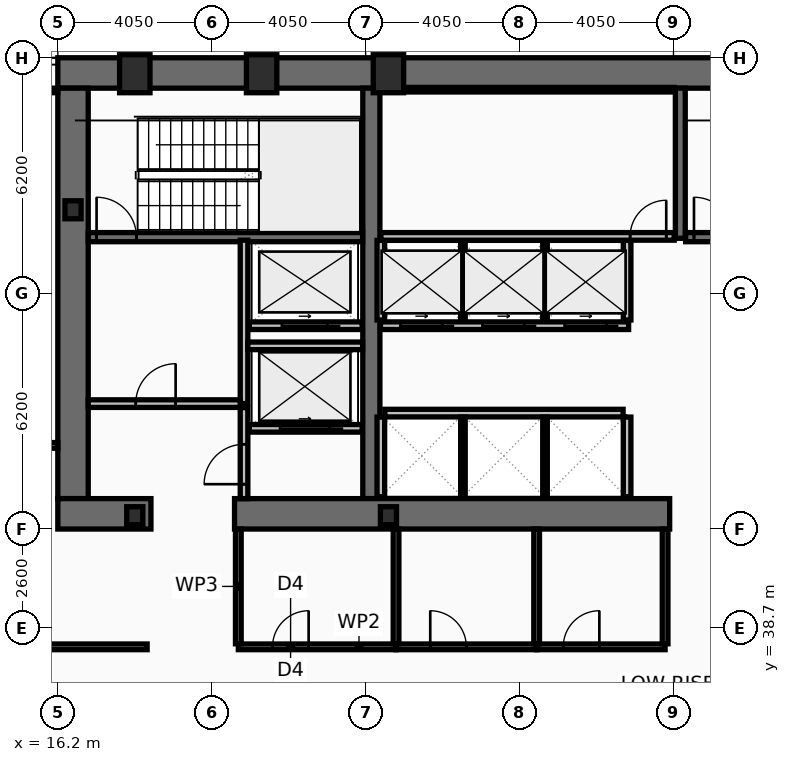
"""IFC4 building model, lengths in metres.
Left out: names, types, materials, properties, quantities, classifications, styles, units other than length and angle.
Written with IfcOpenShell. Run it as: python <this file> out.ifc"""

import sys

from ifc_helpers import new_model, si_unit, direction, frame, frame_2d, origin, origin_2d, place, context, subcontext, project, spatial, rectangle, hollow_rectangle, i_section, extrude, element, fill, save


model = new_model("IFC4")
c1 = context("Model", 3, precision=1e-05, world=origin(), true_north=direction((0.0, 1.0)))
c2 = subcontext(c1, "Body", "Model", "MODEL_VIEW")
j1 = project(units=[si_unit("LENGTHUNIT", "METRE"), si_unit("PLANEANGLEUNIT", "RADIAN")], contexts=[c1])
p1 = place(None, origin())
s1 = spatial("IfcSite", under=j1, at=p1, CompositionType="ELEMENT")
p2 = place(p1, origin())
s2 = spatial("IfcBuilding", under=s1, at=p2, CompositionType="ELEMENT")
p3 = place(p2, frame((0.0, 0.0, 45.8)))
s3 = spatial("IfcBuildingStorey", under=s2, at=p3, CompositionType="ELEMENT", Elevation=45.8)
p4 = place(p3, frame((16.2, 53.3, 0.0), z_axis=(0.0, 0.0, 1.0), x_axis=(1.0, 0.0, 0.0)))
e1 = element("IfcWall", 1, at=p4, inside=s3, PredefinedType="SHEAR", context=c2, shape_type="SweptSolid", body=[
    extrude(rectangle(XDim=40.5, YDim=0.8, at=frame_2d((20.25, 0.0))), origin(), (0.0, 0.0, 1.0), 3.82),
])
p5 = place(p3, frame((16.6, 42.1, 0.0), z_axis=(0.0, 0.0, 1.0), x_axis=(0.0, 1.0, 0.0)))
e2 = element("IfcWall", 2, at=p5, inside=s3, PredefinedType="SHEAR", context=c2, shape_type="SweptSolid", body=[
    extrude(rectangle(XDim=10.8, YDim=0.8, at=frame_2d((5.4, 0.0))), origin(), (0.0, 0.0, 1.0), 3.82),
])
p6 = place(p3, frame((24.45, 42.1, 0.0), z_axis=(0.0, 0.0, 1.0), x_axis=(0.0, 1.0, 0.0)))
e3 = element("IfcWall", 3, at=p6, inside=s3, PredefinedType="SHEAR", context=c2, shape_type="SweptSolid", body=[
    extrude(rectangle(XDim=10.8, YDim=0.45, at=frame_2d((5.4, 0.0))), origin(), (0.0, 0.0, 1.0), 3.82),
])
p7 = place(p3, frame((18.65, 41.7, 0.0), z_axis=(0.0, 0.0, 1.0), x_axis=(-1.0, 0.0, 0.0)))
e4 = element("IfcWall", 4, at=p7, inside=s3, PredefinedType="SHEAR", context=c2, shape_type="SweptSolid", body=[
    extrude(rectangle(XDim=2.45, YDim=0.8, at=frame_2d((1.225, 0.0))), origin(), (0.0, 0.0, 1.0), 3.82),
])
p8 = place(p3, frame((32.3, 41.7, 0.0), z_axis=(0.0, 0.0, 1.0), x_axis=(-1.0, 0.0, 0.0)))
e5 = element("IfcWall", 5, at=p8, inside=s3, PredefinedType="SHEAR", context=c2, shape_type="SweptSolid", body=[
    extrude(rectangle(XDim=11.45, YDim=0.8, at=frame_2d((5.725, 0.0))), origin(), (0.0, 0.0, 1.0), 3.82),
])
p9 = place(p3, frame((32.58, 48.95, 0.0), z_axis=(0.0, 0.0, 1.0), x_axis=(0.0, 1.0, 0.0)))
e6 = element("IfcWall", 6, at=p9, inside=s3, PredefinedType="SHEAR", context=c2, shape_type="SweptSolid", body=[
    extrude(rectangle(XDim=3.95, YDim=0.26, at=frame_2d((1.975, 0.0))), origin(), (0.0, 0.0, 1.0), 3.82),
])
p10 = place(p3, frame((17.0, 48.98, 0.0), z_axis=(0.0, 0.0, 1.0), x_axis=(1.0, 0.0, 0.0)))
e7 = element("IfcWall", 7, at=p10, inside=s3, PredefinedType="SHEAR", context=c2, shape_type="SweptSolid", body=[
    extrude(rectangle(XDim=7.22, YDim=0.24, at=frame_2d((3.61, 0.0))), origin(), (0.0, 0.0, 1.0), 3.82),
])
p11 = place(p10, frame((0.22, 0.0, 0.0)))
e8 = element("IfcOpeningElement", 8, at=p11, cuts=e7, PredefinedType="OPENING", context=c2, shape_type="SweptSolid", body=[
    extrude(rectangle(XDim=1.05, YDim=2.15, at=frame_2d((0.525, 1.075))), frame((0.0, 0.13, 0.0), z_axis=(0.0, -1.0, 0.0), x_axis=(1.0, 0.0, 0.0)), (0.0, 0.0, 1.0), 0.26),
])
p12 = place(p3, frame((32.72, 48.98, 0.0), z_axis=(0.0, 0.0, 1.0), x_axis=(1.0, 0.0, 0.0)))
e9 = element("IfcWall", 9, at=p12, inside=s3, PredefinedType="SHEAR", context=c2, shape_type="SweptSolid", body=[
    extrude(rectangle(XDim=7.56, YDim=0.24, at=frame_2d((3.78, 0.0))), origin(), (0.0, 0.0, 1.0), 3.82),
])
p13 = place(p12, frame((0.22, 0.0, 0.0)))
e10 = element("IfcOpeningElement", 10, at=p13, cuts=e9, PredefinedType="OPENING", context=c2, shape_type="SweptSolid", body=[
    extrude(rectangle(XDim=1.05, YDim=2.15, at=frame_2d((0.525, 1.075))), frame((0.0, 0.13, 0.0), z_axis=(0.0, -1.0, 0.0), x_axis=(1.0, 0.0, 0.0)), (0.0, 0.0, 1.0), 0.26),
])
for number, where, z_axis, x_axis in (
    (11, (18.225, 53.28, 0.0), (0.0, 0.0, 1.0), (1.0, 0.0, 0.0)),
    (12, (21.562, 53.28, 0.0), (0.0, 0.0, 1.0), (1.0, 0.0, 0.0)),
    (13, (24.9, 53.28, 0.0), (0.0, 0.0, 1.0), (1.0, 0.0, 0.0)),
):
    element("IfcColumn", number, at=place(p3, frame(where, z_axis=z_axis, x_axis=x_axis)), inside=s3, PredefinedType="COLUMN", context=c2, shape_type="SweptSolid", body=[
        extrude(hollow_rectangle(XDim=0.8, YDim=1.0, WallThickness=0.055, at=origin_2d()), origin(), (0.0, 0.0, 1.0), 4.0),
    ])
for number, where, z_axis, x_axis in (
    (14, (16.6, 49.7, 0.0), (0.0, 0.0, 1.0), (1.0, 0.0, 0.0)),
    (15, (18.225, 41.65, 0.0), (0.0, 0.0, 1.0), (1.0, 0.0, 0.0)),
    (16, (24.9, 41.65, 0.0), (0.0, 0.0, 1.0), (1.0, 0.0, 0.0)),
):
    element("IfcColumn", number, at=place(p3, frame(where, z_axis=z_axis, x_axis=x_axis)), inside=s3, PredefinedType="COLUMN", context=c2, shape_type="SweptSolid", body=[
        extrude(i_section(OverallWidth=0.424, OverallDepth=0.474, WebThickness=0.048, FlangeThickness=0.077, at=origin_2d()), origin(), (0.0, 0.0, 1.0), 4.0),
    ])
p14 = place(p3, frame((24.21, 43.95, 0.0), z_axis=(0.0, 0.0, 1.0), x_axis=(-1.0, 0.0, 0.0)))
e17 = element("IfcWall", 17, at=p14, inside=s3, PredefinedType="PARTITIONING", context=c2, shape_type="SweptSolid", body=[
    extrude(rectangle(XDim=2.97, YDim=0.2, at=frame_2d((1.485, 0.0))), origin(), (0.0, 0.0, 1.0), 3.82),
])
p15 = place(p14, frame((0.86, 0.0, 0.0)))
e18 = element("IfcOpeningElement", 18, at=p15, cuts=e17, PredefinedType="OPENING", context=c2, shape_type="SweptSolid", body=[
    extrude(rectangle(XDim=1.3, YDim=2.18, at=frame_2d((0.65, 1.09))), frame((0.0, 0.11, 0.0), z_axis=(0.0, -1.0, 0.0), x_axis=(1.0, 0.0, 0.0)), (0.0, 0.0, 1.0), 0.22),
])
p16 = place(p3, frame((24.21, 46.65, 0.0), z_axis=(0.0, 0.0, 1.0), x_axis=(-1.0, 0.0, 0.0)))
e19 = element("IfcWall", 19, at=p16, inside=s3, PredefinedType="PARTITIONING", context=c2, shape_type="SweptSolid", body=[
    extrude(rectangle(XDim=2.97, YDim=0.2, at=frame_2d((1.485, 0.0))), origin(), (0.0, 0.0, 1.0), 3.82),
])
p17 = place(p16, frame((0.91, 0.0, 0.0)))
e20 = element("IfcOpeningElement", 20, at=p17, cuts=e19, PredefinedType="OPENING", context=c2, shape_type="SweptSolid", body=[
    extrude(rectangle(XDim=1.2, YDim=2.18, at=frame_2d((0.6, 1.09))), frame((0.0, 0.11, 0.0), z_axis=(0.0, -1.0, 0.0), x_axis=(1.0, 0.0, 0.0)), (0.0, 0.0, 1.0), 0.22),
])
p18 = place(p3, frame((31.22, 46.65, 0.0), z_axis=(0.0, 0.0, 1.0), x_axis=(-1.0, 0.0, 0.0)))
e21 = element("IfcWall", 21, at=p18, inside=s3, PredefinedType="PARTITIONING", context=c2, shape_type="SweptSolid", body=[
    extrude(rectangle(XDim=6.53, YDim=0.2, at=frame_2d((3.265, 0.0))), origin(), (0.0, 0.0, 1.0), 3.82),
])
p19 = place(p18, frame((4.9, 0.0, 0.0)))
e22 = element("IfcOpeningElement", 22, at=p19, cuts=e21, PredefinedType="OPENING", context=c2, shape_type="SweptSolid", body=[
    extrude(rectangle(XDim=1.1, YDim=2.18, at=frame_2d((0.55, 1.09))), frame((0.0, 0.11, 0.0), z_axis=(0.0, -1.0, 0.0), x_axis=(1.0, 0.0, 0.0)), (0.0, 0.0, 1.0), 0.22),
])
p20 = place(p18, frame((2.74, 0.0, 0.0)))
e23 = element("IfcOpeningElement", 23, at=p20, cuts=e21, PredefinedType="OPENING", context=c2, shape_type="SweptSolid", body=[
    extrude(rectangle(XDim=1.1, YDim=2.18, at=frame_2d((0.55, 1.09))), frame((0.0, 0.11, 0.0), z_axis=(0.0, -1.0, 0.0), x_axis=(1.0, 0.0, 0.0)), (0.0, 0.0, 1.0), 0.22),
])
p21 = place(p18, frame((0.58, 0.0, 0.0)))
e24 = element("IfcOpeningElement", 24, at=p21, cuts=e21, PredefinedType="OPENING", context=c2, shape_type="SweptSolid", body=[
    extrude(rectangle(XDim=1.1, YDim=2.18, at=frame_2d((0.55, 1.09))), frame((0.0, 0.11, 0.0), z_axis=(0.0, -1.0, 0.0), x_axis=(1.0, 0.0, 0.0)), (0.0, 0.0, 1.0), 0.22),
])
p22 = place(p3, frame((21.1, 44.6, 0.0), z_axis=(0.0, 0.0, 1.0), x_axis=(0.0, 1.0, 0.0)))
e25 = element("IfcWall", 25, at=p22, inside=s3, PredefinedType="PARTITIONING", context=c2, shape_type="SweptSolid", body=[
    extrude(rectangle(XDim=4.3, YDim=0.2, at=frame_2d((2.15, 0.0))), origin(), (0.0, 0.0, 1.0), 3.82),
])
p23 = place(p3, frame((17.0, 44.6, 0.0), z_axis=(0.0, 0.0, 1.0), x_axis=(1.0, 0.0, 0.0)))
e26 = element("IfcWall", 26, at=p23, inside=s3, PredefinedType="PARTITIONING", context=c2, shape_type="SweptSolid", body=[
    extrude(rectangle(XDim=4.0, YDim=0.2, at=frame_2d((2.0, 0.0))), origin(), (0.0, 0.0, 1.0), 3.82),
])
p24 = place(p23, frame((1.25, 0.0, 0.0)))
e27 = element("IfcOpeningElement", 27, at=p24, cuts=e26, PredefinedType="OPENING", context=c2, shape_type="SweptSolid", body=[
    extrude(rectangle(XDim=1.05, YDim=2.15, at=frame_2d((0.525, 1.075))), frame((0.0, 0.11, 0.0), z_axis=(0.0, -1.0, 0.0), x_axis=(1.0, 0.0, 0.0)), (0.0, 0.0, 1.0), 0.22),
])
p25 = place(p3, frame((21.2, 46.12, 0.0), z_axis=(0.0, 0.0, 1.0), x_axis=(1.0, 0.0, 0.0)))
e28 = element("IfcWall", 28, at=p25, inside=s3, PredefinedType="PARTITIONING", context=c2, shape_type="SweptSolid", body=[
    extrude(rectangle(XDim=3.02, YDim=0.2, at=frame_2d((1.51, 0.0))), origin(), (0.0, 0.0, 1.0), 3.82),
])
p26 = place(p3, frame((21.1, 42.1, 0.0), z_axis=(0.0, 0.0, 1.0), x_axis=(0.0, 1.0, 0.0)))
e29 = element("IfcWall", 29, at=p26, inside=s3, PredefinedType="PARTITIONING", context=c2, shape_type="SweptSolid", body=[
    extrude(rectangle(XDim=2.395, YDim=0.2, at=frame_2d((1.198, 0.0))), origin(), (0.0, 0.0, 1.0), 3.82),
])
p27 = place(p26, frame((0.38, 0.0, 0.0)))
e30 = element("IfcOpeningElement", 30, at=p27, cuts=e29, PredefinedType="OPENING", context=c2, shape_type="SweptSolid", body=[
    extrude(rectangle(XDim=1.05, YDim=2.15, at=frame_2d((0.525, 1.075))), frame((0.0, 0.11, 0.0), z_axis=(0.0, -1.0, 0.0), x_axis=(1.0, 0.0, 0.0)), (0.0, 0.0, 1.0), 0.22),
])
for number, where, z_axis, x_axis in (
    (31, (24.7, 46.8, 0.0), (0.0, 0.0, 1.0), (0.0, 1.0, 0.0)),
    (32, (31.18, 46.8, 0.0), (0.0, 0.0, 1.0), (0.0, 1.0, 0.0)),
):
    element("IfcWall", number, at=place(p3, frame(where, z_axis=z_axis, x_axis=x_axis)), inside=s3, PredefinedType="PARTITIONING", context=c2, shape_type="SweptSolid", body=[
        extrude(rectangle(XDim=2.095, YDim=0.2, at=frame_2d((1.047, 0.0))), origin(), (0.0, 0.0, 1.0), 3.82),
    ])
for number, where, z_axis, x_axis in (
    (33, (26.86, 46.8, 0.0), (0.0, 0.0, 1.0), (0.0, 1.0, 0.0)),
    (34, (29.02, 46.8, 0.0), (0.0, 0.0, 1.0), (0.0, 1.0, 0.0)),
):
    element("IfcWall", number, at=place(p3, frame(where, z_axis=z_axis, x_axis=x_axis)), inside=s3, PredefinedType="PARTITIONING", context=c2, shape_type="SweptSolid", body=[
        extrude(rectangle(XDim=2.095, YDim=0.12, at=frame_2d((1.047, 0.0))), origin(), (0.0, 0.0, 1.0), 3.82),
    ])
p28 = place(p3, frame((24.805, 44.35, 0.0), z_axis=(0.0, 0.0, 1.0), x_axis=(1.0, 0.0, 0.0)))
e35 = element("IfcWall", 35, at=p28, inside=s3, PredefinedType="PARTITIONING", context=c2, shape_type="SweptSolid", body=[
    extrude(rectangle(XDim=6.27, YDim=0.2, at=frame_2d((3.135, 0.0))), origin(), (0.0, 0.0, 1.0), 3.82),
])
for number, where, z_axis, x_axis in (
    (36, (24.7, 42.15, 0.0), (0.0, 0.0, 1.0), (0.0, 1.0, 0.0)),
    (37, (31.18, 42.15, 0.0), (0.0, 0.0, 1.0), (0.0, 1.0, 0.0)),
):
    element("IfcWall", number, at=place(p3, frame(where, z_axis=z_axis, x_axis=x_axis)), inside=s3, PredefinedType="PARTITIONING", context=c2, shape_type="SweptSolid", body=[
        extrude(rectangle(XDim=2.095, YDim=0.2, at=frame_2d((1.048, 0.0))), origin(), (0.0, 0.0, 1.0), 3.82),
    ])
for number, where, z_axis, x_axis in (
    (38, (26.86, 42.15, 0.0), (0.0, 0.0, 1.0), (0.0, 1.0, 0.0)),
    (39, (29.02, 42.15, 0.0), (0.0, 0.0, 1.0), (0.0, 1.0, 0.0)),
):
    element("IfcWall", number, at=place(p3, frame(where, z_axis=z_axis, x_axis=x_axis)), inside=s3, PredefinedType="PARTITIONING", context=c2, shape_type="SweptSolid", body=[
        extrude(rectangle(XDim=2.095, YDim=0.12, at=frame_2d((1.048, 0.0))), origin(), (0.0, 0.0, 1.0), 3.82),
    ])
p29 = place(p3, frame((24.7, 52.86, 0.0), z_axis=(0.0, 0.0, 1.0), x_axis=(1.0, 0.0, 0.0)))
e40 = element("IfcWall", 40, at=p29, inside=s3, PredefinedType="PARTITIONING", context=c2, shape_type="SweptSolid", body=[
    extrude(rectangle(XDim=7.72, YDim=0.12, at=frame_2d((3.86, 0.0))), origin(), (0.0, 0.0, 1.0), 3.82),
])
p30 = place(p3, frame((24.7, 49.0, 0.0), z_axis=(0.0, 0.0, 1.0), x_axis=(1.0, 0.0, 0.0)))
e41 = element("IfcWall", 41, at=p30, inside=s3, PredefinedType="PARTITIONING", context=c2, shape_type="SweptSolid", body=[
    extrude(rectangle(XDim=7.72, YDim=0.2, at=frame_2d((3.86, 0.0))), origin(), (0.0, 0.0, 1.0), 3.82),
])
p31 = place(p30, frame((6.56, 0.0, 0.0)))
e42 = element("IfcOpeningElement", 42, at=p31, cuts=e41, PredefinedType="OPENING", context=c2, shape_type="SweptSolid", body=[
    extrude(rectangle(XDim=0.95, YDim=2.1, at=frame_2d((0.475, 1.05))), frame((0.0, 0.11, 0.0), z_axis=(0.0, -1.0, 0.0), x_axis=(1.0, 0.0, 0.0)), (0.0, 0.0, 1.0), 0.22),
])
p32 = place(p3, frame((20.95, 38.2, 0.0), z_axis=(0.0, 0.0, 1.0), x_axis=(1.0, 0.0, 0.0)))
e43 = element("IfcWall", 43, at=p32, inside=s3, PredefinedType="PARTITIONING", context=c2, shape_type="SweptSolid", body=[
    extrude(rectangle(XDim=4.15, YDim=0.15, at=frame_2d((2.075, 0.0))), origin(), (0.0, 0.0, 1.0), 3.01),
])
p33 = place(p32, frame((0.9, 0.0, 0.0)))
e44 = element("IfcOpeningElement", 44, at=p33, cuts=e43, PredefinedType="OPENING", context=c2, shape_type="SweptSolid", body=[
    extrude(rectangle(XDim=0.95, YDim=2.05, at=frame_2d((0.475, 1.025))), frame((0.0, 0.085, 0.0), z_axis=(0.0, -1.0, 0.0), x_axis=(1.0, 0.0, 0.0)), (0.0, 0.0, 1.0), 0.17),
])
p34 = place(p3, frame((25.1, 38.2, 0.0), z_axis=(0.0, 0.0, 1.0), x_axis=(1.0, 0.0, 0.0)))
e45 = element("IfcWall", 45, at=p34, inside=s3, PredefinedType="PARTITIONING", context=c2, shape_type="SweptSolid", body=[
    extrude(rectangle(XDim=3.7, YDim=0.15, at=frame_2d((1.85, 0.0))), origin(), (0.0, 0.0, 1.0), 3.01),
])
p35 = place(p34, frame((0.9, 0.0, 0.0)))
e46 = element("IfcOpeningElement", 46, at=p35, cuts=e45, PredefinedType="OPENING", context=c2, shape_type="SweptSolid", body=[
    extrude(rectangle(XDim=0.95, YDim=2.05, at=frame_2d((0.475, 1.025))), frame((0.0, 0.085, 0.0), z_axis=(0.0, -1.0, 0.0), x_axis=(1.0, 0.0, 0.0)), (0.0, 0.0, 1.0), 0.17),
])
p36 = place(p3, frame((28.8, 38.2, 0.0), z_axis=(0.0, 0.0, 1.0), x_axis=(1.0, 0.0, 0.0)))
e47 = element("IfcWall", 47, at=p36, inside=s3, PredefinedType="PARTITIONING", context=c2, shape_type="SweptSolid", body=[
    extrude(rectangle(XDim=3.38, YDim=0.15, at=frame_2d((1.69, 0.0))), origin(), (0.0, 0.0, 1.0), 3.01),
])
p37 = place(p36, frame((0.7, 0.0, 0.0)))
e48 = element("IfcOpeningElement", 48, at=p37, cuts=e47, PredefinedType="OPENING", context=c2, shape_type="SweptSolid", body=[
    extrude(rectangle(XDim=0.95, YDim=2.05, at=frame_2d((0.475, 1.025))), frame((0.0, 0.085, 0.0), z_axis=(0.0, -1.0, 0.0), x_axis=(1.0, 0.0, 0.0)), (0.0, 0.0, 1.0), 0.17),
])
p38 = place(p3, frame((20.95, 38.28, 0.0), z_axis=(0.0, 0.0, 1.0), x_axis=(0.0, 1.0, 0.0)))
e49 = element("IfcWall", 49, at=p38, inside=s3, PredefinedType="PARTITIONING", context=c2, shape_type="SweptSolid", body=[
    extrude(rectangle(XDim=3.02, YDim=0.15, at=frame_2d((1.51, 0.0))), origin(), (0.0, 0.0, 1.0), 3.82),
])
p39 = place(p3, frame((25.1, 38.28, 0.0), z_axis=(0.0, 0.0, 1.0), x_axis=(0.0, 1.0, 0.0)))
e50 = element("IfcWall", 50, at=p39, inside=s3, PredefinedType="PARTITIONING", context=c2, shape_type="SweptSolid", body=[
    extrude(rectangle(XDim=3.02, YDim=0.15, at=frame_2d((1.51, 0.0))), origin(), (0.0, 0.0, 1.0), 3.01),
])
for number, where, z_axis, x_axis in (
    (51, (28.8, 38.28, 0.0), (0.0, 0.0, 1.0), (0.0, 1.0, 0.0)),
    (52, (32.18, 38.28, 0.0), (0.0, 0.0, 1.0), (0.0, 1.0, 0.0)),
):
    element("IfcWall", number, at=place(p3, frame(where, z_axis=z_axis, x_axis=x_axis)), inside=s3, PredefinedType="PARTITIONING", context=c2, shape_type="SweptSolid", body=[
        extrude(rectangle(XDim=3.02, YDim=0.15, at=frame_2d((1.51, 0.0))), origin(), (0.0, 0.0, 1.0), 3.82),
    ])
p40 = place(p3, frame((2.03, 38.2, 0.0), z_axis=(0.0, 0.0, 1.0), x_axis=(1.0, 0.0, 0.0)))
e53 = element("IfcWall", 53, at=p40, inside=s3, PredefinedType="PARTITIONING", context=c2, shape_type="SweptSolid", body=[
    extrude(rectangle(XDim=16.52, YDim=0.15, at=frame_2d((8.26, 0.0))), origin(), (0.0, 0.0, 1.0), 3.01),
])
p41 = place(p40, frame((12.32, 0.0, 0.0)))
e54 = element("IfcOpeningElement", 54, at=p41, cuts=e53, PredefinedType="OPENING", context=c2, shape_type="SweptSolid", body=[
    extrude(rectangle(XDim=0.95, YDim=2.05, at=frame_2d((0.475, 1.025))), frame((0.0, 0.085, 0.0), z_axis=(0.0, -1.0, 0.0), x_axis=(1.0, 0.0, 0.0)), (0.0, 0.0, 1.0), 0.17),
])
p42 = place(p3, frame((2.095, 43.5, 0.0), z_axis=(0.0, 0.0, 1.0), x_axis=(1.0, 0.0, 0.0)))
e55 = element("IfcWall", 55, at=p42, inside=s3, PredefinedType="PARTITIONING", context=c2, shape_type="SweptSolid", body=[
    extrude(rectangle(XDim=14.105, YDim=0.15, at=frame_2d((7.052, 0.0))), origin(), (0.0, 0.0, 1.0), 3.01),
])
p43 = place(p42, frame((12.32, 0.0, 0.0)))
e56 = element("IfcOpeningElement", 56, at=p43, cuts=e55, PredefinedType="OPENING", context=c2, shape_type="SweptSolid", body=[
    extrude(rectangle(XDim=0.9, YDim=2.05, at=frame_2d((0.45, 1.025))), frame((0.0, 0.085, 0.0), z_axis=(0.0, -1.0, 0.0), x_axis=(1.0, 0.0, 0.0)), (0.0, 0.0, 1.0), 0.17),
])
p44 = place(p3, frame((2.095, 52.84, 0.0), z_axis=(0.0, 0.0, 1.0), x_axis=(1.0, 0.0, 0.0)))
e57 = element("IfcWall", 57, at=p44, inside=s3, PredefinedType="PARTITIONING", context=c2, shape_type="SweptSolid", body=[
    extrude(rectangle(XDim=14.105, YDim=0.12, at=frame_2d((7.052, 0.0))), origin(), (0.0, 0.0, 1.0), 3.82),
])
p45 = place(p11, origin())
e58 = element("IfcDoor", 58, at=p45, inside=s3, OperationType="SINGLE_SWING_LEFT", PredefinedType="DOOR", context=c2, shape_type="SweptSolid", body=[
    extrude(rectangle(XDim=1.05, YDim=2.15, at=frame_2d((0.525, 1.075))), frame((0.0, 0.025, 0.0), z_axis=(0.0, -1.0, 0.0), x_axis=(1.0, 0.0, 0.0)), (0.0, 0.0, 1.0), 0.05),
])
fill(e8, e58)
p46 = place(p13, origin())
e59 = element("IfcDoor", 59, at=p46, inside=s3, OperationType="SINGLE_SWING_LEFT", PredefinedType="DOOR", context=c2, shape_type="SweptSolid", body=[
    extrude(rectangle(XDim=1.05, YDim=2.15, at=frame_2d((0.525, 1.075))), frame((0.0, 0.025, 0.0), z_axis=(0.0, -1.0, 0.0), x_axis=(1.0, 0.0, 0.0)), (0.0, 0.0, 1.0), 0.05),
])
fill(e10, e59)
p47 = place(p15, origin())
e60 = element("IfcDoor", 60, at=p47, inside=s3, OperationType="SLIDING_TO_LEFT", PredefinedType="DOOR", context=c2, shape_type="SweptSolid", body=[
    extrude(rectangle(XDim=1.3, YDim=2.18, at=frame_2d((0.65, 1.09))), frame((0.0, 0.025, 0.0), z_axis=(0.0, -1.0, 0.0), x_axis=(1.0, 0.0, 0.0)), (0.0, 0.0, 1.0), 0.05),
])
fill(e18, e60)
p48 = place(p17, origin())
e61 = element("IfcDoor", 61, at=p48, inside=s3, OperationType="SLIDING_TO_LEFT", PredefinedType="DOOR", context=c2, shape_type="SweptSolid", body=[
    extrude(rectangle(XDim=1.2, YDim=2.18, at=frame_2d((0.6, 1.09))), frame((0.0, 0.025, 0.0), z_axis=(0.0, -1.0, 0.0), x_axis=(1.0, 0.0, 0.0)), (0.0, 0.0, 1.0), 0.05),
])
fill(e20, e61)
p49 = place(p19, origin())
e62 = element("IfcDoor", 62, at=p49, inside=s3, OperationType="SLIDING_TO_LEFT", PredefinedType="DOOR", context=c2, shape_type="SweptSolid", body=[
    extrude(rectangle(XDim=1.1, YDim=2.18, at=frame_2d((0.55, 1.09))), frame((0.0, 0.025, 0.0), z_axis=(0.0, -1.0, 0.0), x_axis=(1.0, 0.0, 0.0)), (0.0, 0.0, 1.0), 0.05),
])
fill(e22, e62)
p50 = place(p20, origin())
e63 = element("IfcDoor", 63, at=p50, inside=s3, OperationType="SLIDING_TO_LEFT", PredefinedType="DOOR", context=c2, shape_type="SweptSolid", body=[
    extrude(rectangle(XDim=1.1, YDim=2.18, at=frame_2d((0.55, 1.09))), frame((0.0, 0.025, 0.0), z_axis=(0.0, -1.0, 0.0), x_axis=(1.0, 0.0, 0.0)), (0.0, 0.0, 1.0), 0.05),
])
fill(e23, e63)
p51 = place(p21, origin())
e64 = element("IfcDoor", 64, at=p51, inside=s3, OperationType="SLIDING_TO_LEFT", PredefinedType="DOOR", context=c2, shape_type="SweptSolid", body=[
    extrude(rectangle(XDim=1.1, YDim=2.18, at=frame_2d((0.55, 1.09))), frame((0.0, 0.025, 0.0), z_axis=(0.0, -1.0, 0.0), x_axis=(1.0, 0.0, 0.0)), (0.0, 0.0, 1.0), 0.05),
])
fill(e24, e64)
p52 = place(p24, origin())
e65 = element("IfcDoor", 65, at=p52, inside=s3, OperationType="SINGLE_SWING_RIGHT", PredefinedType="DOOR", context=c2, shape_type="SweptSolid", body=[
    extrude(rectangle(XDim=1.05, YDim=2.15, at=frame_2d((0.525, 1.075))), frame((0.0, 0.025, 0.0), z_axis=(0.0, -1.0, 0.0), x_axis=(1.0, 0.0, 0.0)), (0.0, 0.0, 1.0), 0.05),
])
fill(e27, e65)
p53 = place(p27, origin())
e66 = element("IfcDoor", 66, at=p53, inside=s3, OperationType="SINGLE_SWING_LEFT", PredefinedType="DOOR", context=c2, shape_type="SweptSolid", body=[
    extrude(rectangle(XDim=1.05, YDim=2.15, at=frame_2d((0.525, 1.075))), frame((0.0, 0.025, 0.0), z_axis=(0.0, -1.0, 0.0), x_axis=(1.0, 0.0, 0.0)), (0.0, 0.0, 1.0), 0.05),
])
fill(e30, e66)
p54 = place(p31, origin())
e67 = element("IfcDoor", 67, at=p54, inside=s3, OperationType="SINGLE_SWING_RIGHT", PredefinedType="DOOR", context=c2, shape_type="SweptSolid", body=[
    extrude(rectangle(XDim=0.95, YDim=2.1, at=frame_2d((0.475, 1.05))), frame((0.0, 0.025, 0.0), z_axis=(0.0, -1.0, 0.0), x_axis=(1.0, 0.0, 0.0)), (0.0, 0.0, 1.0), 0.05),
])
fill(e42, e67)
p55 = place(p33, origin())
e68 = element("IfcDoor", 68, at=p55, inside=s3, OperationType="SINGLE_SWING_RIGHT", PredefinedType="DOOR", context=c2, shape_type="SweptSolid", body=[
    extrude(rectangle(XDim=0.95, YDim=2.05, at=frame_2d((0.475, 1.025))), frame((0.0, 0.025, 0.0), z_axis=(0.0, -1.0, 0.0), x_axis=(1.0, 0.0, 0.0)), (0.0, 0.0, 1.0), 0.05),
])
fill(e44, e68)
p56 = place(p35, origin())
e69 = element("IfcDoor", 69, at=p56, inside=s3, OperationType="SINGLE_SWING_LEFT", PredefinedType="DOOR", context=c2, shape_type="SweptSolid", body=[
    extrude(rectangle(XDim=0.95, YDim=2.05, at=frame_2d((0.475, 1.025))), frame((0.0, 0.025, 0.0), z_axis=(0.0, -1.0, 0.0), x_axis=(1.0, 0.0, 0.0)), (0.0, 0.0, 1.0), 0.05),
])
fill(e46, e69)
p57 = place(p37, origin())
e70 = element("IfcDoor", 70, at=p57, inside=s3, OperationType="SINGLE_SWING_RIGHT", PredefinedType="DOOR", context=c2, shape_type="SweptSolid", body=[
    extrude(rectangle(XDim=0.95, YDim=2.05, at=frame_2d((0.475, 1.025))), frame((0.0, 0.025, 0.0), z_axis=(0.0, -1.0, 0.0), x_axis=(1.0, 0.0, 0.0)), (0.0, 0.0, 1.0), 0.05),
])
fill(e48, e70)
save(model, sys.argv[1])
